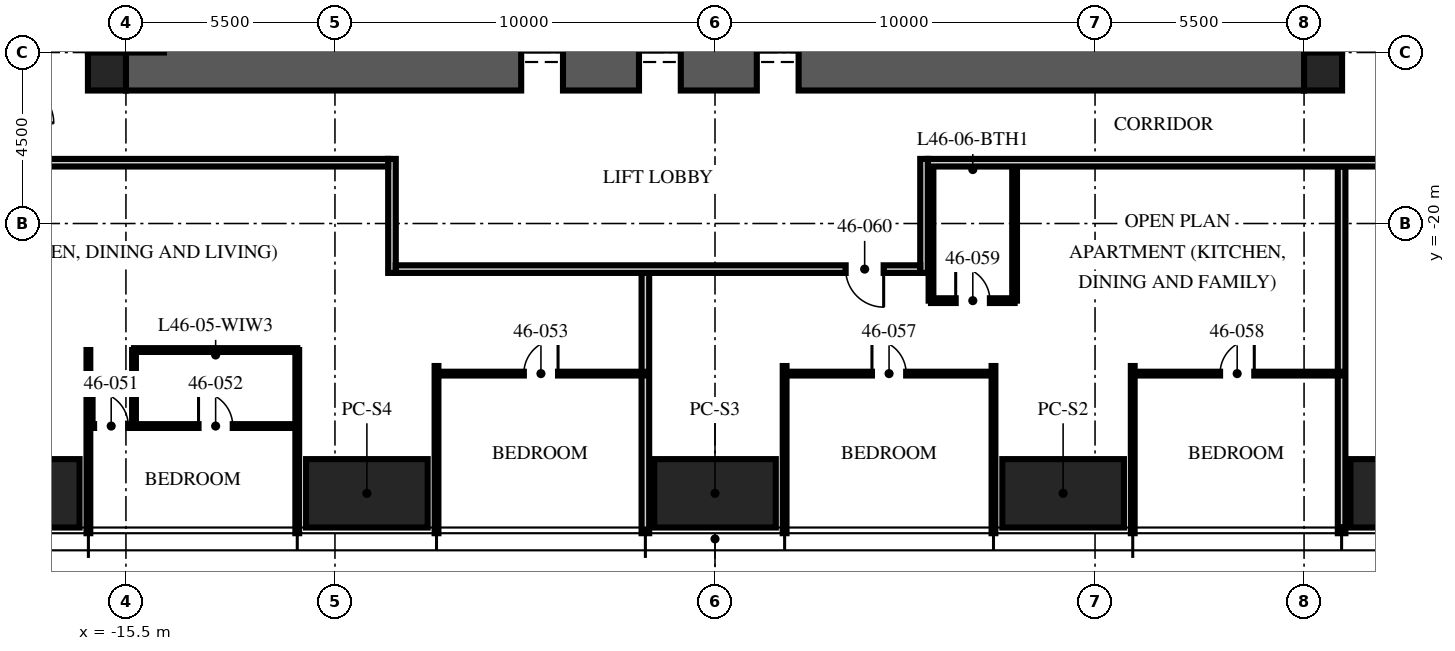
"""IFC4 building model, lengths in metres.
Left out: names, types, materials, properties, quantities, classifications, styles, units other than length and angle.
Written with IfcOpenShell. Run it as: python <this file> out.ifc"""

import sys

from ifc_helpers import new_model, si_unit, direction, frame, frame_2d, origin, origin_2d, place, context, subcontext, project, spatial, rectangle, hollow_rectangle, extrude, element, fill, save


model = new_model("IFC4")
c1 = context("Model", 3, precision=1e-05, world=origin(), true_north=direction((0.0, 1.0)))
c2 = subcontext(c1, "Body", "Model", "MODEL_VIEW")
j1 = project(units=[si_unit("LENGTHUNIT", "METRE"), si_unit("PLANEANGLEUNIT", "RADIAN")], contexts=[c1])
p1 = place(None, origin())
s1 = spatial("IfcSite", under=j1, at=p1, CompositionType="ELEMENT")
p2 = place(p1, origin())
s2 = spatial("IfcBuilding", under=s1, at=p2, CompositionType="ELEMENT")
p3 = place(p2, frame((0.0, 0.0, 182.25)))
s3 = spatial("IfcBuildingStorey", under=s2, at=p3, CompositionType="ELEMENT", Elevation=182.25)
p4 = place(p3, frame((-15.5, -15.5, -0.25), z_axis=(0.0, 0.0, 1.0), x_axis=(1.0, 0.0, 0.0)))
e1 = element("IfcWall", 1, at=p4, inside=s3, PredefinedType="SHEAR", context=c2, shape_type="SweptSolid", body=[
    extrude(rectangle(XDim=31.0, YDim=2.0, at=frame_2d((15.5, 0.0))), origin(), (0.0, 0.0, 1.0), 3.7),
])
p5 = place(p4, frame((10.4, 0.0, 0.25)))
e2 = element("IfcOpeningElement", 2, at=p5, cuts=e1, PredefinedType="OPENING", context=c2, shape_type="SweptSolid", body=[
    extrude(rectangle(XDim=1.1, YDim=2.1, at=frame_2d((0.55, 1.05))), frame((0.0, 1.01, 0.0), z_axis=(0.0, -1.0, 0.0), x_axis=(1.0, 0.0, 0.0)), (0.0, 0.0, 1.0), 2.02),
])
p6 = place(p4, frame((13.5, 0.0, 0.25)))
e3 = element("IfcOpeningElement", 3, at=p6, cuts=e1, PredefinedType="OPENING", context=c2, shape_type="SweptSolid", body=[
    extrude(rectangle(XDim=1.1, YDim=2.1, at=frame_2d((0.55, 1.05))), frame((0.0, 1.01, 0.0), z_axis=(0.0, -1.0, 0.0), x_axis=(1.0, 0.0, 0.0)), (0.0, 0.0, 1.0), 2.02),
])
p7 = place(p4, frame((16.6, 0.0, 0.25)))
e4 = element("IfcOpeningElement", 4, at=p7, cuts=e1, PredefinedType="OPENING", context=c2, shape_type="SweptSolid", body=[
    extrude(rectangle(XDim=1.1, YDim=2.1, at=frame_2d((0.55, 1.05))), frame((0.0, 1.01, 0.0), z_axis=(0.0, -1.0, 0.0), x_axis=(1.0, 0.0, 0.0)), (0.0, 0.0, 1.0), 2.02),
])
for number, where, z_axis, x_axis in (
    (5, (-16.0, -16.0, -0.25), (0.0, 0.0, 1.0), (1.0, 0.0, 0.0)),
    (6, (16.0, -16.0, -0.25), (0.0, 0.0, 1.0), (1.0, 0.0, 0.0)),
):
    element("IfcColumn", number, at=place(p3, frame(where, z_axis=z_axis, x_axis=x_axis)), inside=s3, PredefinedType="COLUMN", context=c2, shape_type="SweptSolid", body=[
        extrude(rectangle(XDim=1.0, YDim=1.0, at=origin_2d()), origin(), (0.0, 0.0, 1.0), 3.7),
    ])
for number, where, z_axis, x_axis in (
    (7, (18.32, -27.1, 0.0), (0.0, 0.0, 1.0), (1.0, 0.0, 0.0)),
    (8, (9.16, -27.1, 0.0), (0.0, 0.0, 1.0), (1.0, 0.0, 0.0)),
    (9, (0.0, -27.1, 0.0), (0.0, 0.0, 1.0), (1.0, 0.0, 0.0)),
    (10, (-9.16, -27.1, 0.0), (0.0, 0.0, 1.0), (1.0, 0.0, 0.0)),
    (11, (-18.32, -27.1, 0.0), (0.0, 0.0, 1.0), (1.0, 0.0, 0.0)),
):
    element("IfcColumn", number, at=place(p3, frame(where, z_axis=z_axis, x_axis=x_axis)), inside=s3, PredefinedType="COLUMN", context=c2, shape_type="SweptSolid", body=[
        extrude(hollow_rectangle(XDim=3.2, YDim=1.8, WallThickness=0.2, at=origin_2d()), origin(), (0.0, 0.0, 1.0), 3.75),
    ])
for number, where, z_axis, x_axis in (
    (12, (-16.488, -23.33, 0.0), (0.0, 0.0, 1.0), (0.0, -1.0, 0.0)),
    (13, (-10.992, -23.33, 0.0), (0.0, 0.0, 1.0), (0.0, -1.0, 0.0)),
):
    element("IfcWall", number, at=place(p3, frame(where, z_axis=z_axis, x_axis=x_axis)), inside=s3, PredefinedType="PARTITIONING", context=c2, shape_type="SweptSolid", body=[
        extrude(rectangle(XDim=4.82, YDim=0.1, at=frame_2d((2.41, 0.0))), origin(), (0.0, 0.0, 1.0), 2.56),
    ])
p8 = place(p3, frame((-7.328, -23.75, 0.0), z_axis=(0.0, 0.0, 1.0), x_axis=(0.0, -1.0, 0.0)))
e14 = element("IfcWall", 14, at=p8, inside=s3, PredefinedType="PARTITIONING", context=c2, shape_type="SweptSolid", body=[
    extrude(rectangle(XDim=4.4, YDim=0.1, at=frame_2d((2.2, 0.0))), origin(), (0.0, 0.0, 1.0), 2.56),
])
p9 = place(p3, frame((-1.832, -21.3, 0.0), z_axis=(0.0, 0.0, 1.0), x_axis=(0.0, -1.0, 0.0)))
e15 = element("IfcWall", 15, at=p9, inside=s3, PredefinedType="PARTITIONING", context=c2, shape_type="SweptSolid", body=[
    extrude(rectangle(XDim=6.85, YDim=0.2, at=frame_2d((3.425, 0.0))), origin(), (0.0, 0.0, 1.0), 2.56),
])
for number, where, z_axis, x_axis in (
    (16, (1.832, -23.75, 0.0), (0.0, 0.0, 1.0), (0.0, -1.0, 0.0)),
    (17, (7.328, -23.75, 0.0), (0.0, 0.0, 1.0), (0.0, -1.0, 0.0)),
    (18, (10.992, -23.75, 0.0), (0.0, 0.0, 1.0), (0.0, -1.0, 0.0)),
):
    element("IfcWall", number, at=place(p3, frame(where, z_axis=z_axis, x_axis=x_axis)), inside=s3, PredefinedType="PARTITIONING", context=c2, shape_type="SweptSolid", body=[
        extrude(rectangle(XDim=4.4, YDim=0.1, at=frame_2d((2.2, 0.0))), origin(), (0.0, 0.0, 1.0), 2.56),
    ])
p10 = place(p3, frame((16.488, -18.5, 0.0), z_axis=(0.0, 0.0, 1.0), x_axis=(0.0, -1.0, 0.0)))
e19 = element("IfcWall", 19, at=p10, inside=s3, PredefinedType="PARTITIONING", context=c2, shape_type="SweptSolid", body=[
    extrude(rectangle(XDim=9.65, YDim=0.2, at=frame_2d((4.825, 0.0))), origin(), (0.0, 0.0, 1.0), 2.56),
])
p11 = place(p3, frame((-16.488, -25.33, 0.0), z_axis=(0.0, 0.0, 1.0), x_axis=(1.0, 0.0, 0.0)))
e20 = element("IfcWall", 20, at=p11, inside=s3, PredefinedType="PARTITIONING", context=c2, shape_type="SweptSolid", body=[
    extrude(rectangle(XDim=5.496, YDim=0.1, at=frame_2d((2.748, 0.0))), origin(), (0.0, 0.0, 1.0), 2.56),
])
p12 = place(p11, frame((0.15, 0.0, 0.0)))
e21 = element("IfcOpeningElement", 21, at=p12, cuts=e20, PredefinedType="OPENING", context=c2, shape_type="SweptSolid", body=[
    extrude(rectangle(XDim=0.9, YDim=2.1, at=frame_2d((0.45, 1.05))), frame((0.0, 0.06, 0.0), z_axis=(0.0, -1.0, 0.0), x_axis=(1.0, 0.0, 0.0)), (0.0, 0.0, 1.0), 0.12),
])
p13 = place(p11, frame((2.898, 0.0, 0.0)))
e22 = element("IfcOpeningElement", 22, at=p13, cuts=e20, PredefinedType="OPENING", context=c2, shape_type="SweptSolid", body=[
    extrude(rectangle(XDim=0.9, YDim=2.1, at=frame_2d((0.45, 1.05))), frame((0.0, 0.06, 0.0), z_axis=(0.0, -1.0, 0.0), x_axis=(1.0, 0.0, 0.0)), (0.0, 0.0, 1.0), 0.12),
])
p14 = place(p3, frame((-15.288, -23.33, 0.0), z_axis=(0.0, 0.0, 1.0), x_axis=(0.0, -1.0, 0.0)))
e23 = element("IfcWall", 23, at=p14, inside=s3, PredefinedType="PARTITIONING", context=c2, shape_type="SweptSolid", body=[
    extrude(rectangle(XDim=2.0, YDim=0.1, at=frame_2d((1.0, 0.0))), origin(), (0.0, 0.0, 1.0), 3.45),
])
p15 = place(p3, frame((-15.288, -23.33, 0.0), z_axis=(0.0, 0.0, 1.0), x_axis=(1.0, 0.0, 0.0)))
e24 = element("IfcWall", 24, at=p15, inside=s3, PredefinedType="PARTITIONING", context=c2, shape_type="SweptSolid", body=[
    extrude(rectangle(XDim=4.296, YDim=0.1, at=frame_2d((2.148, 0.0))), origin(), (0.0, 0.0, 1.0), 2.56),
])
p16 = place(p3, frame((-7.328, -23.95, 0.0), z_axis=(0.0, 0.0, 1.0), x_axis=(1.0, 0.0, 0.0)))
e25 = element("IfcWall", 25, at=p16, inside=s3, PredefinedType="PARTITIONING", context=c2, shape_type="SweptSolid", body=[
    extrude(rectangle(XDim=5.496, YDim=0.1, at=frame_2d((2.748, 0.0))), origin(), (0.0, 0.0, 1.0), 2.56),
])
p17 = place(p16, frame((2.298, 0.0, 0.0)))
e26 = element("IfcOpeningElement", 26, at=p17, cuts=e25, PredefinedType="OPENING", context=c2, shape_type="SweptSolid", body=[
    extrude(rectangle(XDim=0.9, YDim=2.1, at=frame_2d((0.45, 1.05))), frame((0.0, 0.06, 0.0), z_axis=(0.0, -1.0, 0.0), x_axis=(1.0, 0.0, 0.0)), (0.0, 0.0, 1.0), 0.12),
])
p18 = place(p3, frame((1.832, -23.95, 0.0), z_axis=(0.0, 0.0, 1.0), x_axis=(1.0, 0.0, 0.0)))
e27 = element("IfcWall", 27, at=p18, inside=s3, PredefinedType="PARTITIONING", context=c2, shape_type="SweptSolid", body=[
    extrude(rectangle(XDim=5.496, YDim=0.1, at=frame_2d((2.748, 0.0))), origin(), (0.0, 0.0, 1.0), 2.56),
])
p19 = place(p18, frame((2.298, 0.0, 0.0)))
e28 = element("IfcOpeningElement", 28, at=p19, cuts=e27, PredefinedType="OPENING", context=c2, shape_type="SweptSolid", body=[
    extrude(rectangle(XDim=0.9, YDim=2.1, at=frame_2d((0.45, 1.05))), frame((0.0, 0.06, 0.0), z_axis=(0.0, -1.0, 0.0), x_axis=(1.0, 0.0, 0.0)), (0.0, 0.0, 1.0), 0.12),
])
p20 = place(p3, frame((10.992, -23.95, 0.0), z_axis=(0.0, 0.0, 1.0), x_axis=(1.0, 0.0, 0.0)))
e29 = element("IfcWall", 29, at=p20, inside=s3, PredefinedType="PARTITIONING", context=c2, shape_type="SweptSolid", body=[
    extrude(rectangle(XDim=5.496, YDim=0.1, at=frame_2d((2.748, 0.0))), origin(), (0.0, 0.0, 1.0), 2.56),
])
p21 = place(p20, frame((2.298, 0.0, 0.0)))
e30 = element("IfcOpeningElement", 30, at=p21, cuts=e29, PredefinedType="OPENING", context=c2, shape_type="SweptSolid", body=[
    extrude(rectangle(XDim=0.9, YDim=2.1, at=frame_2d((0.45, 1.05))), frame((0.0, 0.06, 0.0), z_axis=(0.0, -1.0, 0.0), x_axis=(1.0, 0.0, 0.0)), (0.0, 0.0, 1.0), 0.12),
])
p22 = place(p3, frame((5.684, -22.03, 0.0), z_axis=(0.0, 0.0, 1.0), x_axis=(1.0, 0.0, 0.0)))
e31 = element("IfcWall", 31, at=p22, inside=s3, PredefinedType="PARTITIONING", context=c2, shape_type="SweptSolid", body=[
    extrude(rectangle(XDim=2.2, YDim=0.125, at=frame_2d((1.1, 0.0))), origin(), (0.0, 0.0, 1.0), 3.45),
])
p23 = place(p22, frame((0.65, 0.0, 0.0)))
e32 = element("IfcOpeningElement", 32, at=p23, cuts=e31, PredefinedType="OPENING", context=c2, shape_type="SweptSolid", body=[
    extrude(rectangle(XDim=0.9, YDim=2.1, at=frame_2d((0.45, 1.05))), frame((0.0, 0.073, 0.0), z_axis=(0.0, -1.0, 0.0), x_axis=(1.0, 0.0, 0.0)), (0.0, 0.0, 1.0), 0.145),
])
for number, where, z_axis, x_axis in (
    (33, (5.684, -18.5, 0.0), (0.0, 0.0, 1.0), (0.0, -1.0, 0.0)),
    (34, (7.884, -18.5, 0.0), (0.0, 0.0, 1.0), (0.0, -1.0, 0.0)),
):
    element("IfcWall", number, at=place(p3, frame(where, z_axis=z_axis, x_axis=x_axis)), inside=s3, PredefinedType="PARTITIONING", context=c2, shape_type="SweptSolid", body=[
        extrude(rectangle(XDim=3.53, YDim=0.125, at=frame_2d((1.765, 0.0))), origin(), (0.0, 0.0, 1.0), 3.45),
    ])
p24 = place(p3, frame((18.5, -18.4, 0.0), z_axis=(0.0, 0.0, 1.0), x_axis=(-1.0, 0.0, 0.0)))
e35 = element("IfcWall", 35, at=p24, inside=s3, PredefinedType="PARTITIONING", context=c2, shape_type="SweptSolid", body=[
    extrude(rectangle(XDim=12.9, YDim=0.2, at=frame_2d((6.45, 0.0))), origin(), (0.0, 0.0, 1.0), 2.25),
])
for number, where, z_axis, x_axis in (
    (36, (5.5, -18.3, 0.0), (0.0, 0.0, 1.0), (0.0, -1.0, 0.0)),
    (37, (-8.5, -18.3, 0.0), (0.0, 0.0, 1.0), (0.0, -1.0, 0.0)),
):
    element("IfcWall", number, at=place(p3, frame(where, z_axis=z_axis, x_axis=x_axis)), inside=s3, PredefinedType="PARTITIONING", context=c2, shape_type="SweptSolid", body=[
        extrude(rectangle(XDim=3.0, YDim=0.2, at=frame_2d((1.5, 0.0))), origin(), (0.0, 0.0, 1.0), 3.45),
    ])
p25 = place(p3, frame((5.4, -21.2, 0.0), z_axis=(0.0, 0.0, 1.0), x_axis=(-1.0, 0.0, 0.0)))
e38 = element("IfcWall", 38, at=p25, inside=s3, PredefinedType="PARTITIONING", context=c2, shape_type="SweptSolid", body=[
    extrude(rectangle(XDim=13.8, YDim=0.2, at=frame_2d((6.9, 0.0))), origin(), (0.0, 0.0, 1.0), 2.45),
])
p26 = place(p25, frame((0.962, 0.0, 0.0)))
e39 = element("IfcOpeningElement", 39, at=p26, cuts=e38, PredefinedType="OPENING", context=c2, shape_type="SweptSolid", body=[
    extrude(rectangle(XDim=1.0, YDim=2.2, at=frame_2d((0.5, 1.1))), frame((0.0, 0.11, 0.0), z_axis=(0.0, -1.0, 0.0), x_axis=(1.0, 0.0, 0.0)), (0.0, 0.0, 1.0), 0.22),
])
p27 = place(p3, frame((-8.6, -18.4, 0.0), z_axis=(0.0, 0.0, 1.0), x_axis=(-1.0, 0.0, 0.0)))
e40 = element("IfcWall", 40, at=p27, inside=s3, PredefinedType="PARTITIONING", context=c2, shape_type="SweptSolid", body=[
    extrude(rectangle(XDim=9.9, YDim=0.2, at=frame_2d((4.95, 0.0))), origin(), (0.0, 0.0, 1.0), 2.25),
])
p28 = place(p5, origin())
e41 = element("IfcDoor", 41, at=p28, inside=s3, OperationType="DOUBLE_DOOR_SLIDING", PredefinedType="DOOR", context=c2, shape_type="SweptSolid", body=[
    extrude(rectangle(XDim=1.1, YDim=2.1, at=frame_2d((0.55, 1.05))), frame((0.0, 0.025, 0.0), z_axis=(0.0, -1.0, 0.0), x_axis=(1.0, 0.0, 0.0)), (0.0, 0.0, 1.0), 0.05),
])
fill(e2, e41)
p29 = place(p6, origin())
e42 = element("IfcDoor", 42, at=p29, inside=s3, OperationType="DOUBLE_DOOR_SLIDING", PredefinedType="DOOR", context=c2, shape_type="SweptSolid", body=[
    extrude(rectangle(XDim=1.1, YDim=2.1, at=frame_2d((0.55, 1.05))), frame((0.0, 0.025, 0.0), z_axis=(0.0, -1.0, 0.0), x_axis=(1.0, 0.0, 0.0)), (0.0, 0.0, 1.0), 0.05),
])
fill(e3, e42)
p30 = place(p7, origin())
e43 = element("IfcDoor", 43, at=p30, inside=s3, OperationType="DOUBLE_DOOR_SLIDING", PredefinedType="DOOR", context=c2, shape_type="SweptSolid", body=[
    extrude(rectangle(XDim=1.1, YDim=2.1, at=frame_2d((0.55, 1.05))), frame((0.0, 0.025, 0.0), z_axis=(0.0, -1.0, 0.0), x_axis=(1.0, 0.0, 0.0)), (0.0, 0.0, 1.0), 0.05),
])
fill(e4, e43)
p31 = place(p12, origin())
e44 = element("IfcDoor", 44, at=p31, inside=s3, OperationType="SINGLE_SWING_LEFT", PredefinedType="DOOR", context=c2, shape_type="SweptSolid", body=[
    extrude(rectangle(XDim=0.9, YDim=2.1, at=frame_2d((0.45, 1.05))), frame((0.0, 0.025, 0.0), z_axis=(0.0, -1.0, 0.0), x_axis=(1.0, 0.0, 0.0)), (0.0, 0.0, 1.0), 0.05),
])
fill(e21, e44)
p32 = place(p13, origin())
e45 = element("IfcDoor", 45, at=p32, inside=s3, OperationType="SINGLE_SWING_LEFT", PredefinedType="DOOR", context=c2, shape_type="SweptSolid", body=[
    extrude(rectangle(XDim=0.9, YDim=2.1, at=frame_2d((0.45, 1.05))), frame((0.0, 0.025, 0.0), z_axis=(0.0, -1.0, 0.0), x_axis=(1.0, 0.0, 0.0)), (0.0, 0.0, 1.0), 0.05),
])
fill(e22, e45)
p33 = place(p17, origin())
e46 = element("IfcDoor", 46, at=p33, inside=s3, OperationType="SINGLE_SWING_RIGHT", PredefinedType="DOOR", context=c2, shape_type="SweptSolid", body=[
    extrude(rectangle(XDim=0.9, YDim=2.1, at=frame_2d((0.45, 1.05))), frame((0.0, 0.025, 0.0), z_axis=(0.0, -1.0, 0.0), x_axis=(1.0, 0.0, 0.0)), (0.0, 0.0, 1.0), 0.05),
])
fill(e26, e46)
p34 = place(p19, origin())
e47 = element("IfcDoor", 47, at=p34, inside=s3, OperationType="SINGLE_SWING_LEFT", PredefinedType="DOOR", context=c2, shape_type="SweptSolid", body=[
    extrude(rectangle(XDim=0.9, YDim=2.1, at=frame_2d((0.45, 1.05))), frame((0.0, 0.025, 0.0), z_axis=(0.0, -1.0, 0.0), x_axis=(1.0, 0.0, 0.0)), (0.0, 0.0, 1.0), 0.05),
])
fill(e28, e47)
p35 = place(p21, origin())
e48 = element("IfcDoor", 48, at=p35, inside=s3, OperationType="SINGLE_SWING_RIGHT", PredefinedType="DOOR", context=c2, shape_type="SweptSolid", body=[
    extrude(rectangle(XDim=0.9, YDim=2.1, at=frame_2d((0.45, 1.05))), frame((0.0, 0.025, 0.0), z_axis=(0.0, -1.0, 0.0), x_axis=(1.0, 0.0, 0.0)), (0.0, 0.0, 1.0), 0.05),
])
fill(e30, e48)
p36 = place(p23, origin())
e49 = element("IfcDoor", 49, at=p36, inside=s3, OperationType="SINGLE_SWING_LEFT", PredefinedType="DOOR", context=c2, shape_type="SweptSolid", body=[
    extrude(rectangle(XDim=0.9, YDim=2.1, at=frame_2d((0.45, 1.05))), frame((0.0, 0.025, 0.0), z_axis=(0.0, -1.0, 0.0), x_axis=(1.0, 0.0, 0.0)), (0.0, 0.0, 1.0), 0.05),
])
fill(e32, e49)
p37 = place(p26, origin())
e50 = element("IfcDoor", 50, at=p37, inside=s3, OperationType="SINGLE_SWING_LEFT", PredefinedType="DOOR", context=c2, shape_type="SweptSolid", body=[
    extrude(rectangle(XDim=1.0, YDim=2.2, at=frame_2d((0.5, 1.1))), frame((0.0, 0.025, 0.0), z_axis=(0.0, -1.0, 0.0), x_axis=(1.0, 0.0, 0.0)), (0.0, 0.0, 1.0), 0.05),
])
fill(e39, e50)
save(model, sys.argv[1])
